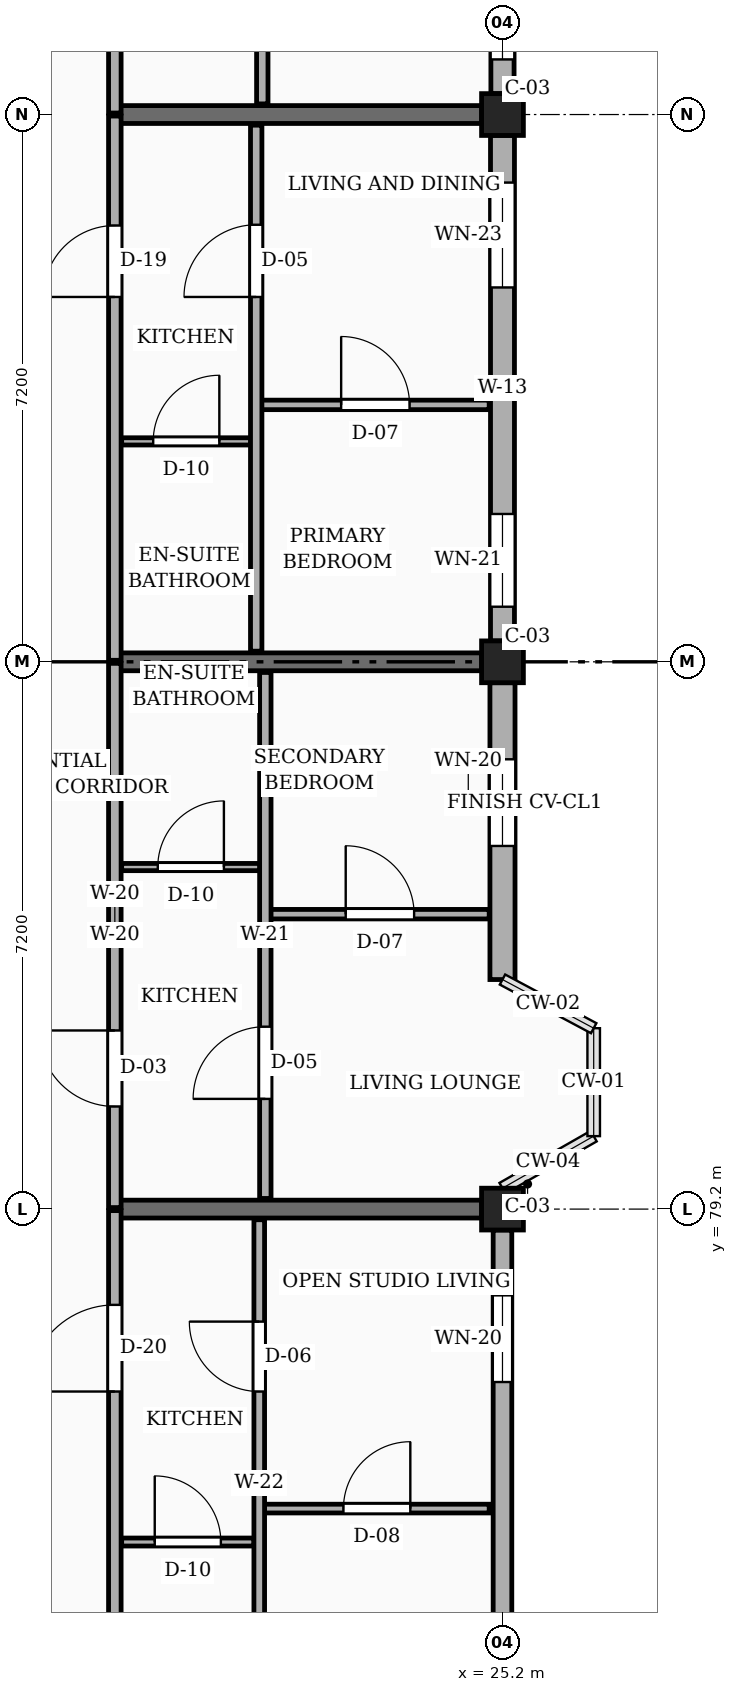
"""IFC4 building model, lengths in metres.
Left out: names, types, materials, properties, quantities, classifications, styles, units other than length and angle.
Written with IfcOpenShell. Run it as: python <this file> out.ifc"""

import sys

from ifc_helpers import new_model, si_unit, direction, frame, frame_2d, origin, origin_2d, place, context, subcontext, project, spatial, rectangle, extrude, element, fill, save


model = new_model("IFC4")
c1 = context("Model", 3, precision=1e-05, world=origin(), true_north=direction((0.0, 1.0)))
c2 = subcontext(c1, "Body", "Model", "MODEL_VIEW")
j1 = project(units=[si_unit("LENGTHUNIT", "METRE"), si_unit("PLANEANGLEUNIT", "RADIAN")], contexts=[c1])
p1 = place(None, origin())
s1 = spatial("IfcSite", under=j1, at=p1, CompositionType="ELEMENT")
p2 = place(p1, origin())
s2 = spatial("IfcBuilding", under=s1, at=p2, CompositionType="ELEMENT")
p3 = place(p2, frame((0.0, 0.0, 17.1)))
s3 = spatial("IfcBuildingStorey", under=s2, at=p3, CompositionType="ELEMENT", Elevation=17.1)
for number, where, z_axis, x_axis in (
    (1, (25.2, 79.2, 0.0), (0.0, 0.0, 1.0), (1.0, 0.0, 0.0)),
    (2, (25.2, 86.4, 0.0), (0.0, 0.0, 1.0), (1.0, 0.0, 0.0)),
    (3, (25.2, 93.6, 0.0), (0.0, 0.0, 1.0), (1.0, 0.0, 0.0)),
):
    element("IfcColumn", number, at=place(p3, frame(where, z_axis=z_axis, x_axis=x_axis)), inside=s3, PredefinedType="COLUMN", context=c2, shape_type="SweptSolid", body=[
        extrude(rectangle(XDim=0.55, YDim=0.55, at=origin_2d()), origin(), (0.0, 0.0, 1.0), 3.15),
    ])
for number, where, z_axis, x_axis in (
    (4, (20.1, 79.2, 0.0), (0.0, 0.0, 1.0), (1.0, 0.0, 0.0)),
    (5, (20.1, 86.4, 0.0), (0.0, 0.0, 1.0), (1.0, 0.0, 0.0)),
    (6, (20.1, 93.6, 0.0), (0.0, 0.0, 1.0), (1.0, 0.0, 0.0)),
):
    element("IfcWall", number, at=place(p3, frame(where, z_axis=z_axis, x_axis=x_axis)), inside=s3, PredefinedType="SOLIDWALL", context=c2, shape_type="SweptSolid", body=[
        extrude(rectangle(XDim=4.825, YDim=0.235, at=frame_2d((2.413, 0.0))), origin(), (0.0, 0.0, 1.0), 2.21),
    ])
p4 = place(p3, frame((25.2, 72.275, 0.0), z_axis=(0.0, 0.0, 1.0), x_axis=(0.0, 1.0, 0.0)))
e7 = element("IfcWall", 7, at=p4, inside=s3, PredefinedType="SOLIDWALL", context=c2, shape_type="SweptSolid", body=[
    extrude(rectangle(XDim=6.65, YDim=0.245, at=frame_2d((3.325, 0.0))), origin(), (0.0, 0.0, 1.0), 2.48),
])
p5 = place(p4, frame((0.45, 0.0, 0.78)))
e8 = element("IfcOpeningElement", 8, at=p5, cuts=e7, PredefinedType="OPENING", context=c2, shape_type="SweptSolid", body=[
    extrude(rectangle(XDim=0.98, YDim=1.36, at=frame_2d((0.49, 0.68))), frame((0.0, 0.133, 0.0), z_axis=(0.0, -1.0, 0.0), x_axis=(1.0, 0.0, 0.0)), (0.0, 0.0, 1.0), 0.265),
])
p6 = place(p4, frame((4.65, 0.0, 0.78)))
e9 = element("IfcOpeningElement", 9, at=p6, cuts=e7, PredefinedType="OPENING", context=c2, shape_type="SweptSolid", body=[
    extrude(rectangle(XDim=1.14, YDim=1.36, at=frame_2d((0.57, 0.68))), frame((0.0, 0.133, 0.0), z_axis=(0.0, -1.0, 0.0), x_axis=(1.0, 0.0, 0.0)), (0.0, 0.0, 1.0), 0.265),
])
p7 = place(p3, frame((25.2, 82.22, 0.0), z_axis=(0.0, 0.0, 1.0), x_axis=(0.0, 1.0, 0.0)))
e10 = element("IfcWall", 10, at=p7, inside=s3, PredefinedType="SOLIDWALL", context=c2, shape_type="SweptSolid", body=[
    extrude(rectangle(XDim=3.905, YDim=0.33, at=frame_2d((1.953, 0.0))), origin(), (0.0, 0.0, 1.0), 2.48),
])
p8 = place(p7, frame((1.758, 0.0, 0.78)))
e11 = element("IfcOpeningElement", 11, at=p8, cuts=e10, PredefinedType="OPENING", context=c2, shape_type="SweptSolid", body=[
    extrude(rectangle(XDim=1.14, YDim=1.36, at=frame_2d((0.57, 0.68))), frame((0.0, 0.175, 0.0), z_axis=(0.0, -1.0, 0.0), x_axis=(1.0, 0.0, 0.0)), (0.0, 0.0, 1.0), 0.35),
])
p9 = place(p3, frame((25.2, 86.675, 0.0), z_axis=(0.0, 0.0, 1.0), x_axis=(0.0, 1.0, 0.0)))
e12 = element("IfcWall", 12, at=p9, inside=s3, PredefinedType="SOLIDWALL", context=c2, shape_type="SweptSolid", body=[
    extrude(rectangle(XDim=6.65, YDim=0.315, at=frame_2d((3.325, 0.0))), origin(), (0.0, 0.0, 1.0), 2.48),
])
p10 = place(p9, frame((0.45, 0.0, 0.78)))
e13 = element("IfcOpeningElement", 13, at=p10, cuts=e12, PredefinedType="OPENING", context=c2, shape_type="SweptSolid", body=[
    extrude(rectangle(XDim=1.22, YDim=1.36, at=frame_2d((0.61, 0.68))), frame((0.0, 0.167, 0.0), z_axis=(0.0, -1.0, 0.0), x_axis=(1.0, 0.0, 0.0)), (0.0, 0.0, 1.0), 0.335),
])
p11 = place(p9, frame((4.65, 0.0, 0.78)))
e14 = element("IfcOpeningElement", 14, at=p11, cuts=e12, PredefinedType="OPENING", context=c2, shape_type="SweptSolid", body=[
    extrude(rectangle(XDim=1.38, YDim=1.36, at=frame_2d((0.69, 0.68))), frame((0.0, 0.167, 0.0), z_axis=(0.0, -1.0, 0.0), x_axis=(1.0, 0.0, 0.0)), (0.0, 0.0, 1.0), 0.335),
])
p12 = place(p3, frame((25.2, 93.875, 0.0), z_axis=(0.0, 0.0, 1.0), x_axis=(0.0, 1.0, 0.0)))
e15 = element("IfcWall", 15, at=p12, inside=s3, PredefinedType="SOLIDWALL", context=c2, shape_type="SweptSolid", body=[
    extrude(rectangle(XDim=6.65, YDim=0.305, at=frame_2d((3.325, 0.0))), origin(), (0.0, 0.0, 1.0), 2.48),
])
p13 = place(p12, frame((0.45, 0.0, 0.78)))
e16 = element("IfcOpeningElement", 16, at=p13, cuts=e15, PredefinedType="OPENING", context=c2, shape_type="SweptSolid", body=[
    extrude(rectangle(XDim=1.38, YDim=1.36, at=frame_2d((0.69, 0.68))), frame((0.0, 0.163, 0.0), z_axis=(0.0, -1.0, 0.0), x_axis=(1.0, 0.0, 0.0)), (0.0, 0.0, 1.0), 0.325),
])
p14 = place(p12, frame((4.65, 0.0, 0.78)))
e17 = element("IfcOpeningElement", 17, at=p14, cuts=e15, PredefinedType="OPENING", context=c2, shape_type="SweptSolid", body=[
    extrude(rectangle(XDim=0.94, YDim=1.44, at=frame_2d((0.47, 0.72))), frame((0.0, 0.163, 0.0), z_axis=(0.0, -1.0, 0.0), x_axis=(1.0, 0.0, 0.0)), (0.0, 0.0, 1.0), 0.325),
])
p15 = place(p3, frame((20.1, 72.02, 0.0), z_axis=(0.0, 0.0, 1.0), x_axis=(0.0, 1.0, 0.0)))
e18 = element("IfcWall", 18, at=p15, inside=s3, PredefinedType="PARTITIONING", context=c2, shape_type="SweptSolid", body=[
    extrude(rectangle(XDim=7.16, YDim=0.165, at=frame_2d((3.58, 0.0))), origin(), (0.0, 0.0, 1.0), 2.345),
])
p16 = place(p15, frame((4.78, 0.0, 0.0)))
e19 = element("IfcOpeningElement", 19, at=p16, cuts=e18, PredefinedType="OPENING", context=c2, shape_type="SweptSolid", body=[
    extrude(rectangle(XDim=1.14, YDim=2.18, at=frame_2d((0.57, 1.09))), frame((0.0, 0.093, 0.0), z_axis=(0.0, -1.0, 0.0), x_axis=(1.0, 0.0, 0.0)), (0.0, 0.0, 1.0), 0.185),
])
p17 = place(p3, frame((20.1, 79.22, 0.0), z_axis=(0.0, 0.0, 1.0), x_axis=(0.0, 1.0, 0.0)))
e20 = element("IfcWall", 20, at=p17, inside=s3, PredefinedType="PARTITIONING", context=c2, shape_type="SweptSolid", body=[
    extrude(rectangle(XDim=7.16, YDim=0.165, at=frame_2d((3.58, 0.0))), origin(), (0.0, 0.0, 1.0), 2.345),
])
p18 = place(p17, frame((1.33, 0.0, 0.0)))
e21 = element("IfcOpeningElement", 21, at=p18, cuts=e20, PredefinedType="OPENING", context=c2, shape_type="SweptSolid", body=[
    extrude(rectangle(XDim=1.0, YDim=2.15, at=frame_2d((0.5, 1.075))), frame((0.0, 0.093, 0.0), z_axis=(0.0, -1.0, 0.0), x_axis=(1.0, 0.0, 0.0)), (0.0, 0.0, 1.0), 0.185),
])
p19 = place(p3, frame((20.1, 86.42, 0.0), z_axis=(0.0, 0.0, 1.0), x_axis=(0.0, 1.0, 0.0)))
e22 = element("IfcWall", 22, at=p19, inside=s3, PredefinedType="PARTITIONING", context=c2, shape_type="SweptSolid", body=[
    extrude(rectangle(XDim=7.16, YDim=0.165, at=frame_2d((3.58, 0.0))), origin(), (0.0, 0.0, 1.0), 2.345),
])
p20 = place(p19, frame((4.78, 0.0, 0.0)))
e23 = element("IfcOpeningElement", 23, at=p20, cuts=e22, PredefinedType="OPENING", context=c2, shape_type="SweptSolid", body=[
    extrude(rectangle(XDim=0.94, YDim=2.12, at=frame_2d((0.47, 1.06))), frame((0.0, 0.093, 0.0), z_axis=(0.0, -1.0, 0.0), x_axis=(1.0, 0.0, 0.0)), (0.0, 0.0, 1.0), 0.185),
])
p21 = place(p3, frame((20.1, 93.62, 0.0), z_axis=(0.0, 0.0, 1.0), x_axis=(0.0, 1.0, 0.0)))
e24 = element("IfcWall", 24, at=p21, inside=s3, PredefinedType="PARTITIONING", context=c2, shape_type="SweptSolid", body=[
    extrude(rectangle(XDim=7.005, YDim=0.165, at=frame_2d((3.502, 0.0))), origin(), (0.0, 0.0, 1.0), 2.345),
])
p22 = place(p21, frame((1.33, 0.0, 0.0)))
e25 = element("IfcOpeningElement", 25, at=p22, cuts=e24, PredefinedType="OPENING", context=c2, shape_type="SweptSolid", body=[
    extrude(rectangle(XDim=1.14, YDim=2.18, at=frame_2d((0.57, 1.09))), frame((0.0, 0.093, 0.0), z_axis=(0.0, -1.0, 0.0), x_axis=(1.0, 0.0, 0.0)), (0.0, 0.0, 1.0), 0.185),
])
p23 = place(p3, frame((22.07, 75.26, 0.0), z_axis=(0.0, 0.0, 1.0), x_axis=(1.0, 0.0, 0.0)))
e26 = element("IfcWall", 26, at=p23, inside=s3, PredefinedType="PARTITIONING", context=c2, shape_type="SweptSolid", body=[
    extrude(rectangle(XDim=2.955, YDim=0.115, at=frame_2d((1.478, 0.0))), origin(), (0.0, 0.0, 1.0), 2.345),
])
p24 = place(p23, frame((1.038, 0.0, 0.0)))
e27 = element("IfcOpeningElement", 27, at=p24, cuts=e26, PredefinedType="OPENING", context=c2, shape_type="SweptSolid", body=[
    extrude(rectangle(XDim=0.88, YDim=2.08, at=frame_2d((0.44, 1.04))), frame((0.0, 0.067, 0.0), z_axis=(0.0, -1.0, 0.0), x_axis=(1.0, 0.0, 0.0)), (0.0, 0.0, 1.0), 0.135),
])
p25 = place(p3, frame((20.19, 74.82, 0.0), z_axis=(0.0, 0.0, 1.0), x_axis=(1.0, 0.0, 0.0)))
e28 = element("IfcWall", 28, at=p25, inside=s3, PredefinedType="PARTITIONING", context=c2, shape_type="SweptSolid", body=[
    extrude(rectangle(XDim=1.74, YDim=0.105, at=frame_2d((0.87, 0.0))), origin(), (0.0, 0.0, 1.0), 2.345),
])
p26 = place(p25, frame((0.435, 0.0, 0.0)))
e29 = element("IfcOpeningElement", 29, at=p26, cuts=e28, PredefinedType="OPENING", context=c2, shape_type="SweptSolid", body=[
    extrude(rectangle(XDim=0.87, YDim=2.05, at=frame_2d((0.435, 1.025))), frame((0.0, 0.062, 0.0), z_axis=(0.0, -1.0, 0.0), x_axis=(1.0, 0.0, 0.0)), (0.0, 0.0, 1.0), 0.125),
])
p27 = place(p3, frame((22.0, 72.14, 0.0), z_axis=(0.0, 0.0, 1.0), x_axis=(0.0, 1.0, 0.0)))
e30 = element("IfcWall", 30, at=p27, inside=s3, PredefinedType="PARTITIONING", context=c2, shape_type="SweptSolid", body=[
    extrude(rectangle(XDim=6.92, YDim=0.14, at=frame_2d((3.46, 0.0))), origin(), (0.0, 0.0, 1.0), 2.345),
])
p28 = place(p27, frame((4.66, 0.0, 0.0)))
e31 = element("IfcOpeningElement", 31, at=p28, cuts=e30, PredefinedType="OPENING", context=c2, shape_type="SweptSolid", body=[
    extrude(rectangle(XDim=0.92, YDim=2.1, at=frame_2d((0.46, 1.05))), frame((0.0, 0.08, 0.0), z_axis=(0.0, -1.0, 0.0), x_axis=(1.0, 0.0, 0.0)), (0.0, 0.0, 1.0), 0.16),
])
p29 = place(p3, frame((22.15, 83.08, 0.0), z_axis=(0.0, 0.0, 1.0), x_axis=(1.0, 0.0, 0.0)))
e32 = element("IfcWall", 32, at=p29, inside=s3, PredefinedType="PARTITIONING", context=c2, shape_type="SweptSolid", body=[
    extrude(rectangle(XDim=2.875, YDim=0.125, at=frame_2d((1.438, 0.0))), origin(), (0.0, 0.0, 1.0), 2.345),
])
p30 = place(p29, frame((0.988, 0.0, 0.0)))
e33 = element("IfcOpeningElement", 33, at=p30, cuts=e32, PredefinedType="OPENING", context=c2, shape_type="SweptSolid", body=[
    extrude(rectangle(XDim=0.9, YDim=2.1, at=frame_2d((0.45, 1.05))), frame((0.0, 0.073, 0.0), z_axis=(0.0, -1.0, 0.0), x_axis=(1.0, 0.0, 0.0)), (0.0, 0.0, 1.0), 0.145),
])
p31 = place(p3, frame((20.19, 83.7, 0.0), z_axis=(0.0, 0.0, 1.0), x_axis=(1.0, 0.0, 0.0)))
e34 = element("IfcWall", 34, at=p31, inside=s3, PredefinedType="PARTITIONING", context=c2, shape_type="SweptSolid", body=[
    extrude(rectangle(XDim=1.82, YDim=0.095, at=frame_2d((0.91, 0.0))), origin(), (0.0, 0.0, 1.0), 2.345),
])
p32 = place(p31, frame((0.475, 0.0, 0.0)))
e35 = element("IfcOpeningElement", 35, at=p32, cuts=e34, PredefinedType="OPENING", context=c2, shape_type="SweptSolid", body=[
    extrude(rectangle(XDim=0.87, YDim=2.05, at=frame_2d((0.435, 1.025))), frame((0.0, 0.058, 0.0), z_axis=(0.0, -1.0, 0.0), x_axis=(1.0, 0.0, 0.0)), (0.0, 0.0, 1.0), 0.115),
])
p33 = place(p3, frame((22.08, 79.34, 0.0), z_axis=(0.0, 0.0, 1.0), x_axis=(0.0, 1.0, 0.0)))
e36 = element("IfcWall", 36, at=p33, inside=s3, PredefinedType="PARTITIONING", context=c2, shape_type="SweptSolid", body=[
    extrude(rectangle(XDim=6.92, YDim=0.15, at=frame_2d((3.46, 0.0))), origin(), (0.0, 0.0, 1.0), 2.345),
])
p34 = place(p33, frame((1.31, 0.0, 0.0)))
e37 = element("IfcOpeningElement", 37, at=p34, cuts=e36, PredefinedType="OPENING", context=c2, shape_type="SweptSolid", body=[
    extrude(rectangle(XDim=0.95, YDim=2.1, at=frame_2d((0.475, 1.05))), frame((0.0, 0.085, 0.0), z_axis=(0.0, -1.0, 0.0), x_axis=(1.0, 0.0, 0.0)), (0.0, 0.0, 1.0), 0.17),
])
p35 = place(p3, frame((22.03, 89.78, 0.0), z_axis=(0.0, 0.0, 1.0), x_axis=(1.0, 0.0, 0.0)))
e38 = element("IfcWall", 38, at=p35, inside=s3, PredefinedType="PARTITIONING", context=c2, shape_type="SweptSolid", body=[
    extrude(rectangle(XDim=2.995, YDim=0.125, at=frame_2d((1.498, 0.0))), origin(), (0.0, 0.0, 1.0), 2.345),
])
p36 = place(p35, frame((1.048, 0.0, 0.0)))
e39 = element("IfcOpeningElement", 39, at=p36, cuts=e38, PredefinedType="OPENING", context=c2, shape_type="SweptSolid", body=[
    extrude(rectangle(XDim=0.9, YDim=2.1, at=frame_2d((0.45, 1.05))), frame((0.0, 0.073, 0.0), z_axis=(0.0, -1.0, 0.0), x_axis=(1.0, 0.0, 0.0)), (0.0, 0.0, 1.0), 0.145),
])
p37 = place(p3, frame((20.19, 89.3, 0.0), z_axis=(0.0, 0.0, 1.0), x_axis=(1.0, 0.0, 0.0)))
e40 = element("IfcWall", 40, at=p37, inside=s3, PredefinedType="PARTITIONING", context=c2, shape_type="SweptSolid", body=[
    extrude(rectangle(XDim=1.7, YDim=0.095, at=frame_2d((0.85, 0.0))), origin(), (0.0, 0.0, 1.0), 2.345),
])
p38 = place(p37, frame((0.415, 0.0, 0.0)))
e41 = element("IfcOpeningElement", 41, at=p38, cuts=e40, PredefinedType="OPENING", context=c2, shape_type="SweptSolid", body=[
    extrude(rectangle(XDim=0.87, YDim=2.05, at=frame_2d((0.435, 1.025))), frame((0.0, 0.058, 0.0), z_axis=(0.0, -1.0, 0.0), x_axis=(1.0, 0.0, 0.0)), (0.0, 0.0, 1.0), 0.115),
])
p39 = place(p3, frame((21.96, 86.54, 0.0), z_axis=(0.0, 0.0, 1.0), x_axis=(0.0, 1.0, 0.0)))
e42 = element("IfcWall", 42, at=p39, inside=s3, PredefinedType="PARTITIONING", context=c2, shape_type="SweptSolid", body=[
    extrude(rectangle(XDim=6.92, YDim=0.15, at=frame_2d((3.46, 0.0))), origin(), (0.0, 0.0, 1.0), 2.345),
])
p40 = place(p39, frame((4.66, 0.0, 0.0)))
e43 = element("IfcOpeningElement", 43, at=p40, cuts=e42, PredefinedType="OPENING", context=c2, shape_type="SweptSolid", body=[
    extrude(rectangle(XDim=0.95, YDim=2.1, at=frame_2d((0.475, 1.05))), frame((0.0, 0.085, 0.0), z_axis=(0.0, -1.0, 0.0), x_axis=(1.0, 0.0, 0.0)), (0.0, 0.0, 1.0), 0.17),
])
p41 = place(p3, frame((22.04, 93.74, 0.0), z_axis=(0.0, 0.0, 1.0), x_axis=(0.0, 1.0, 0.0)))
e44 = element("IfcWall", 44, at=p41, inside=s3, PredefinedType="PARTITIONING", context=c2, shape_type="SweptSolid", body=[
    extrude(rectangle(XDim=6.885, YDim=0.15, at=frame_2d((3.442, 0.0))), origin(), (0.0, 0.0, 1.0), 2.345),
])
p42 = place(p41, frame((1.31, 0.0, 0.0)))
e45 = element("IfcOpeningElement", 45, at=p42, cuts=e44, PredefinedType="OPENING", context=c2, shape_type="SweptSolid", body=[
    extrude(rectangle(XDim=0.92, YDim=2.1, at=frame_2d((0.46, 1.05))), frame((0.0, 0.085, 0.0), z_axis=(0.0, -1.0, 0.0), x_axis=(1.0, 0.0, 0.0)), (0.0, 0.0, 1.0), 0.17),
])
p43 = place(p6, origin())
e46 = element("IfcWindow", 46, at=p43, inside=s3, PartitioningType="SINGLE_PANEL", PredefinedType="WINDOW", context=c2, shape_type="SweptSolid", body=[
    extrude(rectangle(XDim=1.14, YDim=1.36, at=frame_2d((0.57, 0.68))), frame((0.0, 0.03, 0.0), z_axis=(0.0, -1.0, 0.0), x_axis=(1.0, 0.0, 0.0)), (0.0, 0.0, 1.0), 0.06),
])
fill(e9, e46)
p44 = place(p8, origin())
e47 = element("IfcWindow", 47, at=p44, inside=s3, PartitioningType="SINGLE_PANEL", PredefinedType="WINDOW", context=c2, shape_type="SweptSolid", body=[
    extrude(rectangle(XDim=1.14, YDim=1.36, at=frame_2d((0.57, 0.68))), frame((0.0, 0.03, 0.0), z_axis=(0.0, -1.0, 0.0), x_axis=(1.0, 0.0, 0.0)), (0.0, 0.0, 1.0), 0.06),
])
fill(e11, e47)
p45 = place(p10, origin())
e48 = element("IfcWindow", 48, at=p45, inside=s3, PartitioningType="SINGLE_PANEL", PredefinedType="WINDOW", context=c2, shape_type="SweptSolid", body=[
    extrude(rectangle(XDim=1.22, YDim=1.36, at=frame_2d((0.61, 0.68))), frame((0.0, 0.03, 0.0), z_axis=(0.0, -1.0, 0.0), x_axis=(1.0, 0.0, 0.0)), (0.0, 0.0, 1.0), 0.06),
])
fill(e13, e48)
p46 = place(p11, origin())
e49 = element("IfcWindow", 49, at=p46, inside=s3, PartitioningType="SINGLE_PANEL", PredefinedType="WINDOW", context=c2, shape_type="SweptSolid", body=[
    extrude(rectangle(XDim=1.38, YDim=1.36, at=frame_2d((0.69, 0.68))), frame((0.0, 0.03, 0.0), z_axis=(0.0, -1.0, 0.0), x_axis=(1.0, 0.0, 0.0)), (0.0, 0.0, 1.0), 0.06),
])
fill(e14, e49)
p47 = place(p13, origin())
e50 = element("IfcWindow", 50, at=p47, inside=s3, PartitioningType="SINGLE_PANEL", PredefinedType="WINDOW", context=c2, shape_type="SweptSolid", body=[
    extrude(rectangle(XDim=1.38, YDim=1.36, at=frame_2d((0.69, 0.68))), frame((0.0, 0.03, 0.0), z_axis=(0.0, -1.0, 0.0), x_axis=(1.0, 0.0, 0.0)), (0.0, 0.0, 1.0), 0.06),
])
fill(e16, e50)
p48 = place(p16, origin())
e51 = element("IfcDoor", 51, at=p48, inside=s3, OperationType="SINGLE_SWING_LEFT", PredefinedType="DOOR", context=c2, shape_type="SweptSolid", body=[
    extrude(rectangle(XDim=1.14, YDim=2.18, at=frame_2d((0.57, 1.09))), frame((0.0, 0.025, 0.0), z_axis=(0.0, -1.0, 0.0), x_axis=(1.0, 0.0, 0.0)), (0.0, 0.0, 1.0), 0.05),
])
fill(e19, e51)
p49 = place(p18, origin())
e52 = element("IfcDoor", 52, at=p49, inside=s3, OperationType="SINGLE_SWING_RIGHT", PredefinedType="DOOR", context=c2, shape_type="SweptSolid", body=[
    extrude(rectangle(XDim=1.0, YDim=2.15, at=frame_2d((0.5, 1.075))), frame((0.0, 0.025, 0.0), z_axis=(0.0, -1.0, 0.0), x_axis=(1.0, 0.0, 0.0)), (0.0, 0.0, 1.0), 0.05),
])
fill(e21, e52)
p50 = place(p20, origin())
e53 = element("IfcDoor", 53, at=p50, inside=s3, OperationType="SINGLE_SWING_LEFT", PredefinedType="DOOR", context=c2, shape_type="SweptSolid", body=[
    extrude(rectangle(XDim=0.94, YDim=2.12, at=frame_2d((0.47, 1.06))), frame((0.0, 0.025, 0.0), z_axis=(0.0, -1.0, 0.0), x_axis=(1.0, 0.0, 0.0)), (0.0, 0.0, 1.0), 0.05),
])
fill(e23, e53)
p51 = place(p24, origin())
e54 = element("IfcDoor", 54, at=p51, inside=s3, OperationType="SINGLE_SWING_RIGHT", PredefinedType="DOOR", context=c2, shape_type="SweptSolid", body=[
    extrude(rectangle(XDim=0.88, YDim=2.08, at=frame_2d((0.44, 1.04))), frame((0.0, 0.025, 0.0), z_axis=(0.0, -1.0, 0.0), x_axis=(1.0, 0.0, 0.0)), (0.0, 0.0, 1.0), 0.05),
])
fill(e27, e54)
p52 = place(p26, origin())
e55 = element("IfcDoor", 55, at=p52, inside=s3, OperationType="SINGLE_SWING_LEFT", PredefinedType="DOOR", context=c2, shape_type="SweptSolid", body=[
    extrude(rectangle(XDim=0.87, YDim=2.05, at=frame_2d((0.435, 1.025))), frame((0.0, 0.025, 0.0), z_axis=(0.0, -1.0, 0.0), x_axis=(1.0, 0.0, 0.0)), (0.0, 0.0, 1.0), 0.05),
])
fill(e29, e55)
p53 = place(p28, origin())
e56 = element("IfcDoor", 56, at=p53, inside=s3, OperationType="SINGLE_SWING_RIGHT", PredefinedType="DOOR", context=c2, shape_type="SweptSolid", body=[
    extrude(rectangle(XDim=0.92, YDim=2.1, at=frame_2d((0.46, 1.05))), frame((0.0, 0.025, 0.0), z_axis=(0.0, -1.0, 0.0), x_axis=(1.0, 0.0, 0.0)), (0.0, 0.0, 1.0), 0.05),
])
fill(e31, e56)
p54 = place(p30, origin())
e57 = element("IfcDoor", 57, at=p54, inside=s3, OperationType="SINGLE_SWING_LEFT", PredefinedType="DOOR", context=c2, shape_type="SweptSolid", body=[
    extrude(rectangle(XDim=0.9, YDim=2.1, at=frame_2d((0.45, 1.05))), frame((0.0, 0.025, 0.0), z_axis=(0.0, -1.0, 0.0), x_axis=(1.0, 0.0, 0.0)), (0.0, 0.0, 1.0), 0.05),
])
fill(e33, e57)
p55 = place(p32, origin())
e58 = element("IfcDoor", 58, at=p55, inside=s3, OperationType="SINGLE_SWING_RIGHT", PredefinedType="DOOR", context=c2, shape_type="SweptSolid", body=[
    extrude(rectangle(XDim=0.87, YDim=2.05, at=frame_2d((0.435, 1.025))), frame((0.0, 0.025, 0.0), z_axis=(0.0, -1.0, 0.0), x_axis=(1.0, 0.0, 0.0)), (0.0, 0.0, 1.0), 0.05),
])
fill(e35, e58)
p56 = place(p34, origin())
e59 = element("IfcDoor", 59, at=p56, inside=s3, OperationType="SINGLE_SWING_LEFT", PredefinedType="DOOR", context=c2, shape_type="SweptSolid", body=[
    extrude(rectangle(XDim=0.95, YDim=2.1, at=frame_2d((0.475, 1.05))), frame((0.0, 0.025, 0.0), z_axis=(0.0, -1.0, 0.0), x_axis=(1.0, 0.0, 0.0)), (0.0, 0.0, 1.0), 0.05),
])
fill(e37, e59)
p57 = place(p36, origin())
e60 = element("IfcDoor", 60, at=p57, inside=s3, OperationType="SINGLE_SWING_LEFT", PredefinedType="DOOR", context=c2, shape_type="SweptSolid", body=[
    extrude(rectangle(XDim=0.9, YDim=2.1, at=frame_2d((0.45, 1.05))), frame((0.0, 0.025, 0.0), z_axis=(0.0, -1.0, 0.0), x_axis=(1.0, 0.0, 0.0)), (0.0, 0.0, 1.0), 0.05),
])
fill(e39, e60)
p58 = place(p38, origin())
e61 = element("IfcDoor", 61, at=p58, inside=s3, OperationType="SINGLE_SWING_RIGHT", PredefinedType="DOOR", context=c2, shape_type="SweptSolid", body=[
    extrude(rectangle(XDim=0.87, YDim=2.05, at=frame_2d((0.435, 1.025))), frame((0.0, 0.025, 0.0), z_axis=(0.0, -1.0, 0.0), x_axis=(1.0, 0.0, 0.0)), (0.0, 0.0, 1.0), 0.05),
])
fill(e41, e61)
p59 = place(p40, origin())
e62 = element("IfcDoor", 62, at=p59, inside=s3, OperationType="SINGLE_SWING_LEFT", PredefinedType="DOOR", context=c2, shape_type="SweptSolid", body=[
    extrude(rectangle(XDim=0.95, YDim=2.1, at=frame_2d((0.475, 1.05))), frame((0.0, 0.025, 0.0), z_axis=(0.0, -1.0, 0.0), x_axis=(1.0, 0.0, 0.0)), (0.0, 0.0, 1.0), 0.05),
])
fill(e43, e62)
save(model, sys.argv[1])
